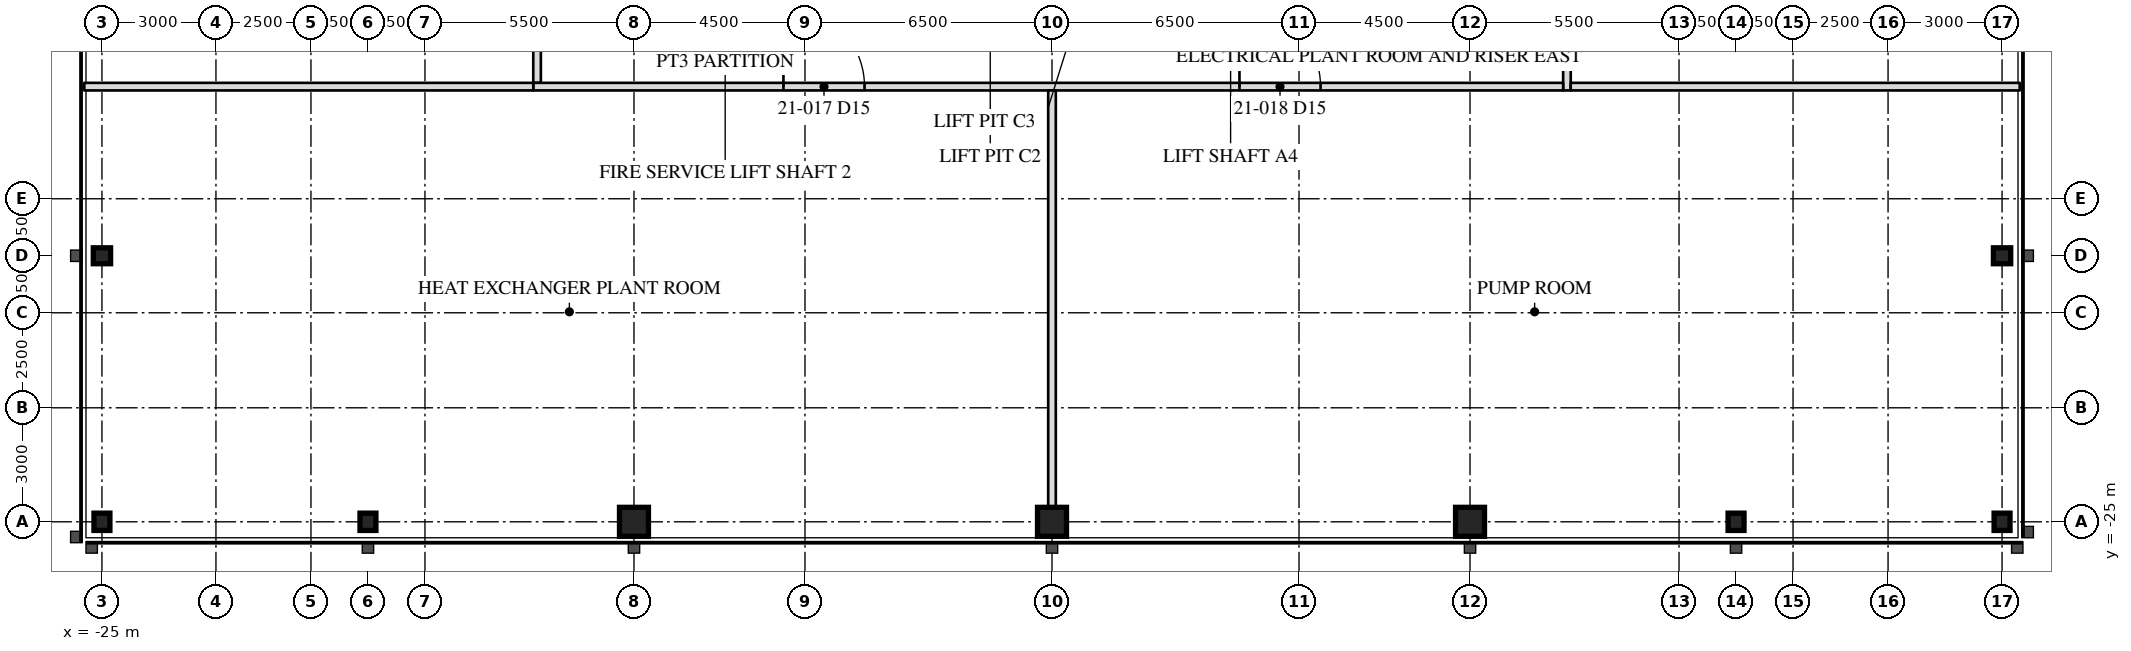
"""IFC4 building model, lengths in metres.
Left out: names, types, materials, properties, quantities, classifications, styles, units other than length and angle.
Written with IfcOpenShell. Run it as: python <this file> out.ifc"""

import sys

from ifc_helpers import new_model, si_unit, direction, frame, frame_2d, origin, origin_2d, place, context, subcontext, project, spatial, rectangle, hollow_rectangle, i_section, extrude, element, fill, save


model = new_model("IFC4")
c1 = context("Model", 3, precision=1e-05, world=origin(), true_north=direction((0.0, 1.0)))
c2 = subcontext(c1, "Body", "Model", "MODEL_VIEW")
j1 = project(units=[si_unit("LENGTHUNIT", "METRE"), si_unit("PLANEANGLEUNIT", "RADIAN")], contexts=[c1])
p1 = place(None, origin())
s1 = spatial("IfcSite", under=j1, at=p1, CompositionType="ELEMENT")
p2 = place(p1, origin())
s2 = spatial("IfcBuilding", under=s1, at=p2, CompositionType="ELEMENT")
p3 = place(p2, frame((0.0, 0.0, 89.8)))
s3 = spatial("IfcBuildingStorey", under=s2, at=p3, CompositionType="ELEMENT", Elevation=89.8)
for number, where, z_axis, x_axis in (
    (1, (-25.0, -18.0, 0.0), (0.0, 0.0, 1.0), (0.0, 1.0, 0.0)),
    (2, (-25.0, -25.0, 0.0), (0.0, 0.0, 1.0), (1.0, 0.0, 0.0)),
    (3, (-18.0, -25.0, 0.0), (0.0, 0.0, 1.0), (1.0, 0.0, 0.0)),
):
    element("IfcColumn", number, at=place(p3, frame(where, z_axis=z_axis, x_axis=x_axis)), inside=s3, PredefinedType="COLUMN", context=c2, shape_type="SweptSolid", body=[
        extrude(i_section(OverallWidth=0.419, OverallDepth=0.455, WebThickness=0.042, FlangeThickness=0.068, at=origin_2d()), origin(), (0.0, 0.0, 1.0), 6.0),
    ])
for number, where, z_axis, x_axis in (
    (4, (-11.0, -25.0, 0.0), (0.0, 0.0, 1.0), (1.0, 0.0, 0.0)),
    (5, (0.0, -25.0, 0.0), (0.0, 0.0, 1.0), (1.0, 0.0, 0.0)),
    (6, (11.0, -25.0, 0.0), (0.0, 0.0, 1.0), (1.0, 0.0, 0.0)),
):
    element("IfcColumn", number, at=place(p3, frame(where, z_axis=z_axis, x_axis=x_axis)), inside=s3, PredefinedType="COLUMN", context=c2, shape_type="SweptSolid", body=[
        extrude(hollow_rectangle(XDim=0.762, YDim=0.762, WallThickness=0.127, at=origin_2d()), origin(), (0.0, 0.0, 1.0), 6.0),
    ])
for number, where, z_axis, x_axis in (
    (7, (18.0, -25.0, 0.0), (0.0, 0.0, 1.0), (1.0, 0.0, 0.0)),
    (8, (25.0, -25.0, 0.0), (0.0, 0.0, 1.0), (1.0, 0.0, 0.0)),
    (9, (25.0, -18.0, 0.0), (0.0, 0.0, 1.0), (0.0, 1.0, 0.0)),
):
    element("IfcColumn", number, at=place(p3, frame(where, z_axis=z_axis, x_axis=x_axis)), inside=s3, PredefinedType="COLUMN", context=c2, shape_type="SweptSolid", body=[
        extrude(i_section(OverallWidth=0.419, OverallDepth=0.455, WebThickness=0.042, FlangeThickness=0.068, at=origin_2d()), origin(), (0.0, 0.0, 1.0), 6.0),
    ])
p4 = place(p3, frame((13.55, -13.65, 0.0), z_axis=(0.0, 0.0, 1.0), x_axis=(0.0, 1.0, 0.0)))
e10 = element("IfcWall", 10, at=p4, inside=s3, PredefinedType="PARTITIONING", context=c2, shape_type="SweptSolid", body=[
    extrude(rectangle(XDim=27.1, YDim=0.2, at=frame_2d((13.55, 0.0))), origin(), (0.0, 0.0, 1.0), 5.81),
])
p5 = place(p4, frame((6.583, 0.0, 0.0)))
e11 = element("IfcOpeningElement", 11, at=p5, cuts=e10, PredefinedType="OPENING", context=c2, shape_type="SweptSolid", body=[
    extrude(rectangle(XDim=2.134, YDim=2.438, at=frame_2d((1.067, 1.219))), frame((0.0, 0.11, 0.0), z_axis=(0.0, -1.0, 0.0), x_axis=(1.0, 0.0, 0.0)), (0.0, 0.0, 1.0), 0.22),
])
p6 = place(p3, frame((-13.55, 13.65, 0.0), z_axis=(0.0, 0.0, 1.0), x_axis=(0.0, -1.0, 0.0)))
e12 = element("IfcWall", 12, at=p6, inside=s3, PredefinedType="PARTITIONING", context=c2, shape_type="SweptSolid", body=[
    extrude(rectangle(XDim=27.1, YDim=0.2, at=frame_2d((13.55, 0.0))), origin(), (0.0, 0.0, 1.0), 5.81),
])
p7 = place(p6, frame((20.583, 0.0, 0.0)))
e13 = element("IfcOpeningElement", 13, at=p7, cuts=e12, PredefinedType="OPENING", context=c2, shape_type="SweptSolid", body=[
    extrude(rectangle(XDim=2.134, YDim=2.438, at=frame_2d((1.067, 1.219))), frame((0.0, 0.11, 0.0), z_axis=(0.0, -1.0, 0.0), x_axis=(1.0, 0.0, 0.0)), (0.0, 0.0, 1.0), 0.22),
])
p8 = place(p6, frame((5.192, 0.0, 0.0)))
e14 = element("IfcOpeningElement", 14, at=p8, cuts=e12, PredefinedType="OPENING", context=c2, shape_type="SweptSolid", body=[
    extrude(rectangle(XDim=0.915, YDim=2.134, at=frame_2d((0.458, 1.067))), frame((0.0, 0.11, 0.0), z_axis=(0.0, -1.0, 0.0), x_axis=(1.0, 0.0, 0.0)), (0.0, 0.0, 1.0), 0.22),
])
p9 = place(p3, frame((-13.65, -13.55, 0.0), z_axis=(0.0, 0.0, 1.0), x_axis=(1.0, 0.0, 0.0)))
e15 = element("IfcWall", 15, at=p9, inside=s3, PredefinedType="PARTITIONING", context=c2, shape_type="SweptSolid", body=[
    extrude(rectangle(XDim=27.1, YDim=0.2, at=frame_2d((13.55, 0.0))), origin(), (0.0, 0.0, 1.0), 5.81),
])
p10 = place(p9, frame((6.583, 0.0, 0.0)))
e16 = element("IfcOpeningElement", 16, at=p10, cuts=e15, PredefinedType="OPENING", context=c2, shape_type="SweptSolid", body=[
    extrude(rectangle(XDim=2.134, YDim=2.438, at=frame_2d((1.067, 1.219))), frame((0.0, 0.11, 0.0), z_axis=(0.0, -1.0, 0.0), x_axis=(1.0, 0.0, 0.0)), (0.0, 0.0, 1.0), 0.22),
])
p11 = place(p9, frame((18.583, 0.0, 0.0)))
e17 = element("IfcOpeningElement", 17, at=p11, cuts=e15, PredefinedType="OPENING", context=c2, shape_type="SweptSolid", body=[
    extrude(rectangle(XDim=2.134, YDim=2.438, at=frame_2d((1.067, 1.219))), frame((0.0, 0.11, 0.0), z_axis=(0.0, -1.0, 0.0), x_axis=(1.0, 0.0, 0.0)), (0.0, 0.0, 1.0), 0.22),
])
for number, where, z_axis, x_axis in (
    (18, (13.65, -13.55, 0.0), (0.0, 0.0, 1.0), (1.0, 0.0, 0.0)),
    (19, (-13.65, -13.55, 0.0), (0.0, 0.0, 1.0), (-1.0, 0.0, 0.0)),
):
    element("IfcWall", number, at=place(p3, frame(where, z_axis=z_axis, x_axis=x_axis)), inside=s3, PredefinedType="PARTITIONING", context=c2, shape_type="SweptSolid", body=[
        extrude(rectangle(XDim=11.815, YDim=0.2, at=frame_2d((5.908, 0.0))), origin(), (0.0, 0.0, 1.0), 5.81),
    ])
p12 = place(p3, frame((0.0, -13.65, 0.0), z_axis=(0.0, 0.0, 1.0), x_axis=(0.0, -1.0, 0.0)))
e20 = element("IfcWall", 20, at=p12, inside=s3, PredefinedType="PARTITIONING", context=c2, shape_type="SweptSolid", body=[
    extrude(rectangle(XDim=11.765, YDim=0.2, at=frame_2d((5.883, 0.0))), origin(), (0.0, 0.0, 1.0), 5.2),
])
p13 = place(p10, origin())
e21 = element("IfcDoor", 21, at=p13, inside=s3, OperationType="DOUBLE_DOOR_SINGLE_SWING", PredefinedType="DOOR", context=c2, shape_type="SweptSolid", body=[
    extrude(rectangle(XDim=2.134, YDim=2.438, at=frame_2d((1.067, 1.219))), frame((0.0, 0.025, 0.0), z_axis=(0.0, -1.0, 0.0), x_axis=(1.0, 0.0, 0.0)), (0.0, 0.0, 1.0), 0.05),
])
fill(e16, e21)
p14 = place(p11, origin())
e22 = element("IfcDoor", 22, at=p14, inside=s3, OperationType="DOUBLE_DOOR_SINGLE_SWING", PredefinedType="DOOR", context=c2, shape_type="SweptSolid", body=[
    extrude(rectangle(XDim=2.134, YDim=2.438, at=frame_2d((1.067, 1.219))), frame((0.0, 0.025, 0.0), z_axis=(0.0, -1.0, 0.0), x_axis=(1.0, 0.0, 0.0)), (0.0, 0.0, 1.0), 0.05),
])
fill(e17, e22)
save(model, sys.argv[1])
